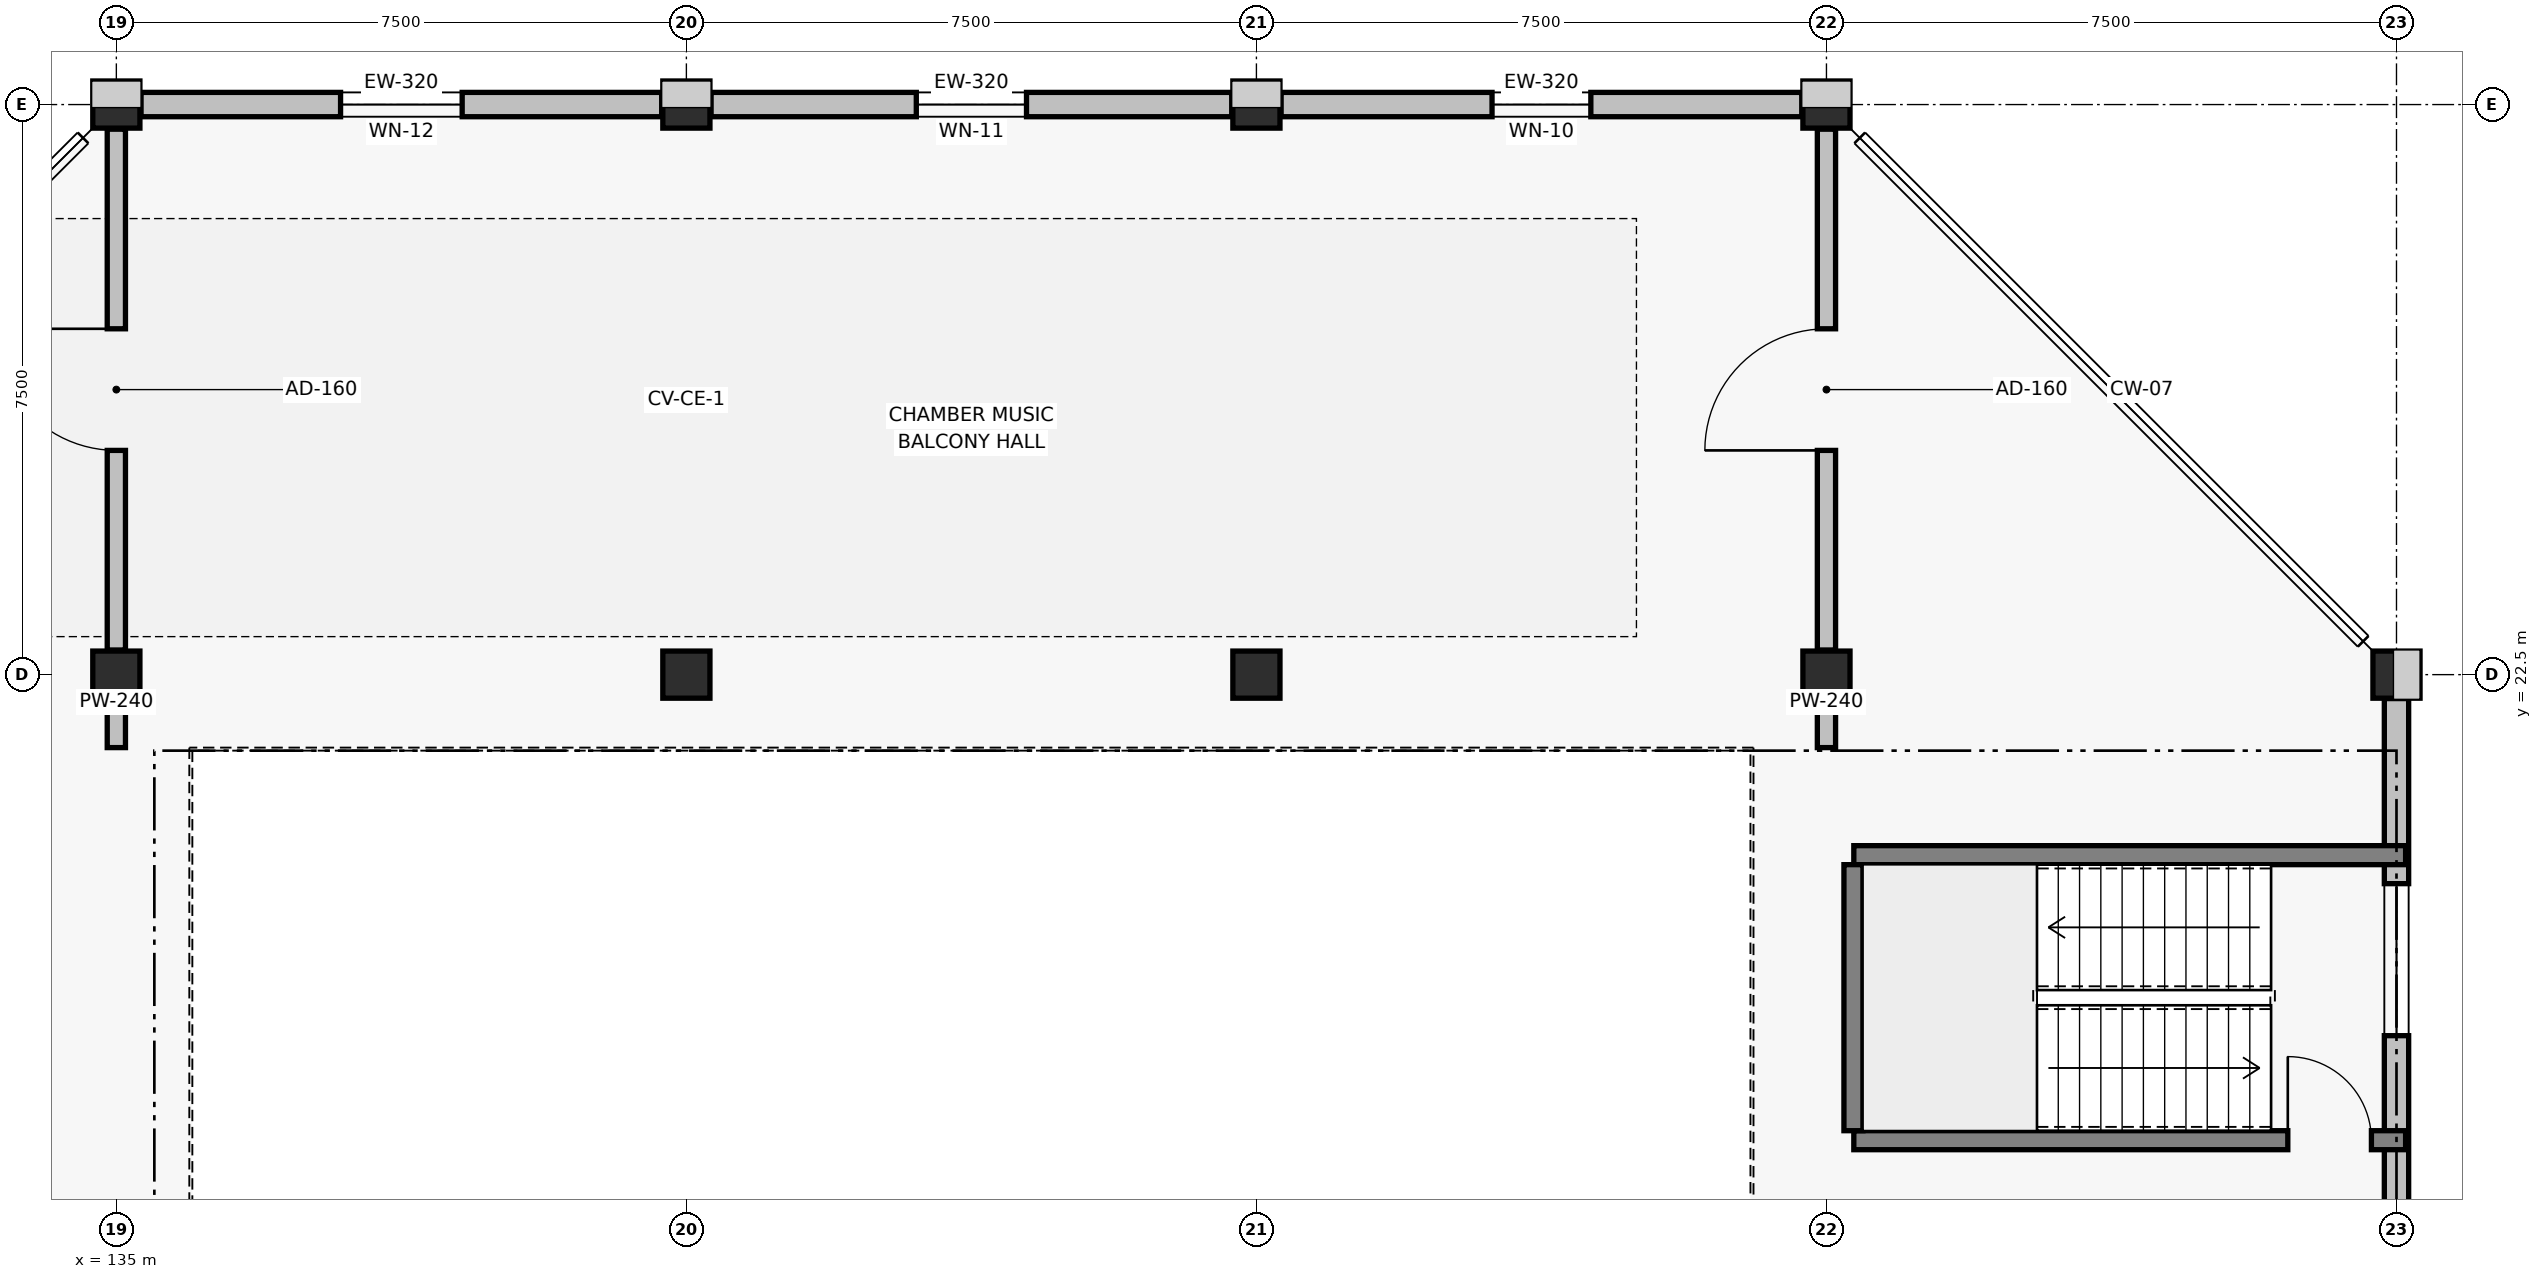
"""IFC4 building model, lengths in metres.
Left out: names, types, materials, properties, quantities, classifications, styles, units other than length and angle.
Written with IfcOpenShell. Run it as: python <this file> out.ifc"""

import sys

from ifc_helpers import new_model, si_unit, direction, frame, frame_2d, origin, origin_2d, place, context, subcontext, project, spatial, rectangle, extrude, element, fill, save


model = new_model("IFC4")
c1 = context("Model", 3, precision=1e-05, world=origin(), true_north=direction((0.0, 1.0)))
c2 = subcontext(c1, "Body", "Model", "MODEL_VIEW")
j1 = project(units=[si_unit("LENGTHUNIT", "METRE"), si_unit("PLANEANGLEUNIT", "RADIAN")], contexts=[c1])
p1 = place(None, origin())
s1 = spatial("IfcSite", under=j1, at=p1, CompositionType="ELEMENT")
p2 = place(p1, origin())
s2 = spatial("IfcBuilding", under=s1, at=p2, CompositionType="ELEMENT")
p3 = place(p2, frame((0.0, 0.0, 4.8)))
s3 = spatial("IfcBuildingStorey", under=s2, at=p3, CompositionType="ELEMENT", Elevation=4.8)
for number, where, z_axis, x_axis in (
    (1, (135.0, 22.5, 0.0), (0.0, 0.0, 1.0), (1.0, 0.0, 0.0)),
    (2, (135.0, 30.0, 0.0), (0.0, 0.0, 1.0), (1.0, 0.0, 0.0)),
    (3, (142.5, 22.5, 0.0), (0.0, 0.0, 1.0), (1.0, 0.0, 0.0)),
    (4, (142.5, 30.0, 0.0), (0.0, 0.0, 1.0), (1.0, 0.0, 0.0)),
    (5, (150.0, 22.5, 0.0), (0.0, 0.0, 1.0), (1.0, 0.0, 0.0)),
    (6, (150.0, 30.0, 0.0), (0.0, 0.0, 1.0), (1.0, 0.0, 0.0)),
    (7, (157.5, 22.5, 0.0), (0.0, 0.0, 1.0), (1.0, 0.0, 0.0)),
    (8, (157.5, 30.0, 0.0), (0.0, 0.0, 1.0), (1.0, 0.0, 0.0)),
    (9, (165.0, 22.5, 0.0), (0.0, 0.0, 1.0), (1.0, 0.0, 0.0)),
):
    element("IfcColumn", number, at=place(p3, frame(where, z_axis=z_axis, x_axis=x_axis)), inside=s3, PredefinedType="COLUMN", context=c2, shape_type="SweptSolid", body=[
        extrude(rectangle(XDim=0.62, YDim=0.62, at=origin_2d()), origin(), (0.0, 0.0, 1.0), 4.2),
    ])
p4 = place(p3, frame((165.0, 15.325, 0.0), z_axis=(0.0, 0.0, 1.0), x_axis=(0.0, 1.0, 0.0)))
e10 = element("IfcWall", 10, at=p4, inside=s3, PredefinedType="SOLIDWALL", context=c2, shape_type="SweptSolid", body=[
    extrude(rectangle(XDim=6.86, YDim=0.32, at=frame_2d((3.43, 0.0))), origin(), (0.0, 0.0, 1.0), 3.04),
])
p5 = place(p4, frame((2.425, 0.0, 0.6)))
e11 = element("IfcOpeningElement", 11, at=p5, cuts=e10, PredefinedType="OPENING", context=c2, shape_type="SweptSolid", body=[
    extrude(rectangle(XDim=2.0, YDim=1.45, at=frame_2d((1.0, 0.725))), frame((0.0, 0.17, 0.0), z_axis=(0.0, -1.0, 0.0), x_axis=(1.0, 0.0, 0.0)), (0.0, 0.0, 1.0), 0.34),
])
p6 = place(p3, frame((157.175, 30.0, 0.0), z_axis=(0.0, 0.0, 1.0), x_axis=(-1.0, 0.0, 0.0)))
e12 = element("IfcWall", 12, at=p6, inside=s3, PredefinedType="SOLIDWALL", context=c2, shape_type="SweptSolid", body=[
    extrude(rectangle(XDim=6.85, YDim=0.32, at=frame_2d((3.425, 0.0))), origin(), (0.0, 0.0, 1.0), 3.14),
])
p7 = place(p6, frame((2.775, 0.0, 0.6)))
e13 = element("IfcOpeningElement", 13, at=p7, cuts=e12, PredefinedType="OPENING", context=c2, shape_type="SweptSolid", body=[
    extrude(rectangle(XDim=1.3, YDim=1.3, at=frame_2d((0.65, 0.65))), frame((0.0, 0.17, 0.0), z_axis=(0.0, -1.0, 0.0), x_axis=(1.0, 0.0, 0.0)), (0.0, 0.0, 1.0), 0.34),
])
p8 = place(p3, frame((149.675, 30.0, 0.0), z_axis=(0.0, 0.0, 1.0), x_axis=(-1.0, 0.0, 0.0)))
e14 = element("IfcWall", 14, at=p8, inside=s3, PredefinedType="SOLIDWALL", context=c2, shape_type="SweptSolid", body=[
    extrude(rectangle(XDim=6.85, YDim=0.32, at=frame_2d((3.425, 0.0))), origin(), (0.0, 0.0, 1.0), 3.14),
])
p9 = place(p8, frame((2.7, 0.0, 0.6)))
e15 = element("IfcOpeningElement", 15, at=p9, cuts=e14, PredefinedType="OPENING", context=c2, shape_type="SweptSolid", body=[
    extrude(rectangle(XDim=1.45, YDim=1.3, at=frame_2d((0.725, 0.65))), frame((0.0, 0.17, 0.0), z_axis=(0.0, -1.0, 0.0), x_axis=(1.0, 0.0, 0.0)), (0.0, 0.0, 1.0), 0.34),
])
p10 = place(p3, frame((142.175, 30.0, 0.0), z_axis=(0.0, 0.0, 1.0), x_axis=(-1.0, 0.0, 0.0)))
e16 = element("IfcWall", 16, at=p10, inside=s3, PredefinedType="SOLIDWALL", context=c2, shape_type="SweptSolid", body=[
    extrude(rectangle(XDim=6.85, YDim=0.32, at=frame_2d((3.425, 0.0))), origin(), (0.0, 0.0, 1.0), 3.14),
])
p11 = place(p10, frame((2.625, 0.0, 0.6)))
e17 = element("IfcOpeningElement", 17, at=p11, cuts=e16, PredefinedType="OPENING", context=c2, shape_type="SweptSolid", body=[
    extrude(rectangle(XDim=1.6, YDim=1.3, at=frame_2d((0.8, 0.65))), frame((0.0, 0.17, 0.0), z_axis=(0.0, -1.0, 0.0), x_axis=(1.0, 0.0, 0.0)), (0.0, 0.0, 1.0), 0.34),
])
p12 = place(p3, frame((157.86, 16.375, 0.0), z_axis=(0.0, 0.0, 1.0), x_axis=(1.0, 0.0, 0.0)))
e18 = element("IfcWall", 18, at=p12, inside=s3, PredefinedType="SOLIDWALL", context=c2, shape_type="SweptSolid", body=[
    extrude(rectangle(XDim=7.26, YDim=0.25, at=frame_2d((3.63, 0.0))), origin(), (0.0, 0.0, 1.0), 3.92),
])
p13 = place(p12, frame((5.71, 0.0, 0.0)))
e19 = element("IfcOpeningElement", 19, at=p13, cuts=e18, PredefinedType="OPENING", context=c2, shape_type="SweptSolid", body=[
    extrude(rectangle(XDim=1.1, YDim=2.15, at=frame_2d((0.55, 1.075))), frame((0.0, 0.135, 0.0), z_axis=(0.0, -1.0, 0.0), x_axis=(1.0, 0.0, 0.0)), (0.0, 0.0, 1.0), 0.27),
])
p14 = place(p3, frame((157.86, 20.125, 0.0), z_axis=(0.0, 0.0, 1.0), x_axis=(1.0, 0.0, 0.0)))
e20 = element("IfcWall", 20, at=p14, inside=s3, PredefinedType="SOLIDWALL", context=c2, shape_type="SweptSolid", body=[
    extrude(rectangle(XDim=7.26, YDim=0.25, at=frame_2d((3.63, 0.0))), origin(), (0.0, 0.0, 1.0), 3.92),
])
p15 = place(p3, frame((157.855, 16.5, 0.0), z_axis=(0.0, 0.0, 1.0), x_axis=(0.0, 1.0, 0.0)))
e21 = element("IfcWall", 21, at=p15, inside=s3, PredefinedType="SOLIDWALL", context=c2, shape_type="SweptSolid", body=[
    extrude(rectangle(XDim=3.5, YDim=0.25, at=frame_2d((1.75, 0.0))), origin(), (0.0, 0.0, 1.0), 3.92),
])
p16 = place(p3, frame((135.0, 21.54, 0.0), z_axis=(0.0, 0.0, 1.0), x_axis=(0.0, 1.0, 0.0)))
e22 = element("IfcWall", 22, at=p16, inside=s3, PredefinedType="PARTITIONING", context=c2, shape_type="SweptSolid", body=[
    extrude(rectangle(XDim=0.636, YDim=0.24, at=frame_2d((0.318, 0.0))), origin(), (0.0, 0.0, 1.0), 2.94),
])
p17 = place(p3, frame((135.0, 22.824, 0.0), z_axis=(0.0, 0.0, 1.0), x_axis=(0.0, 1.0, 0.0)))
e23 = element("IfcWall", 23, at=p17, inside=s3, PredefinedType="PARTITIONING", context=c2, shape_type="SweptSolid", body=[
    extrude(rectangle(XDim=6.852, YDim=0.24, at=frame_2d((3.426, 0.0))), origin(), (0.0, 0.0, 1.0), 2.94),
])
p18 = place(p17, frame((2.626, 0.0, 0.0)))
e24 = element("IfcOpeningElement", 24, at=p18, cuts=e23, PredefinedType="OPENING", context=c2, shape_type="SweptSolid", body=[
    extrude(rectangle(XDim=1.6, YDim=2.16, at=frame_2d((0.8, 1.08))), frame((0.0, 0.13, 0.0), z_axis=(0.0, -1.0, 0.0), x_axis=(1.0, 0.0, 0.0)), (0.0, 0.0, 1.0), 0.26),
])
p19 = place(p3, frame((157.5, 21.54, 0.0), z_axis=(0.0, 0.0, 1.0), x_axis=(0.0, 1.0, 0.0)))
e25 = element("IfcWall", 25, at=p19, inside=s3, PredefinedType="PARTITIONING", context=c2, shape_type="SweptSolid", body=[
    extrude(rectangle(XDim=0.636, YDim=0.24, at=frame_2d((0.318, 0.0))), origin(), (0.0, 0.0, 1.0), 2.84),
])
p20 = place(p3, frame((157.5, 22.824, 0.0), z_axis=(0.0, 0.0, 1.0), x_axis=(0.0, 1.0, 0.0)))
e26 = element("IfcWall", 26, at=p20, inside=s3, PredefinedType="PARTITIONING", context=c2, shape_type="SweptSolid", body=[
    extrude(rectangle(XDim=6.852, YDim=0.24, at=frame_2d((3.426, 0.0))), origin(), (0.0, 0.0, 1.0), 2.84),
])
p21 = place(p20, frame((2.626, 0.0, 0.0)))
e27 = element("IfcOpeningElement", 27, at=p21, cuts=e26, PredefinedType="OPENING", context=c2, shape_type="SweptSolid", body=[
    extrude(rectangle(XDim=1.6, YDim=2.16, at=frame_2d((0.8, 1.08))), frame((0.0, 0.13, 0.0), z_axis=(0.0, -1.0, 0.0), x_axis=(1.0, 0.0, 0.0)), (0.0, 0.0, 1.0), 0.26),
])
p22 = place(p5, origin())
e28 = element("IfcWindow", 28, at=p22, inside=s3, PartitioningType="SINGLE_PANEL", PredefinedType="WINDOW", context=c2, shape_type="SweptSolid", body=[
    extrude(rectangle(XDim=2.0, YDim=1.45, at=frame_2d((1.0, 0.725))), frame((0.0, 0.03, 0.0), z_axis=(0.0, -1.0, 0.0), x_axis=(1.0, 0.0, 0.0)), (0.0, 0.0, 1.0), 0.06),
])
fill(e11, e28)
p23 = place(p7, origin())
e29 = element("IfcWindow", 29, at=p23, inside=s3, PartitioningType="SINGLE_PANEL", PredefinedType="WINDOW", context=c2, shape_type="SweptSolid", body=[
    extrude(rectangle(XDim=1.3, YDim=1.3, at=frame_2d((0.65, 0.65))), frame((0.0, 0.03, 0.0), z_axis=(0.0, -1.0, 0.0), x_axis=(1.0, 0.0, 0.0)), (0.0, 0.0, 1.0), 0.06),
])
fill(e13, e29)
p24 = place(p9, origin())
e30 = element("IfcWindow", 30, at=p24, inside=s3, PartitioningType="SINGLE_PANEL", PredefinedType="WINDOW", context=c2, shape_type="SweptSolid", body=[
    extrude(rectangle(XDim=1.45, YDim=1.3, at=frame_2d((0.725, 0.65))), frame((0.0, 0.03, 0.0), z_axis=(0.0, -1.0, 0.0), x_axis=(1.0, 0.0, 0.0)), (0.0, 0.0, 1.0), 0.06),
])
fill(e15, e30)
p25 = place(p11, origin())
e31 = element("IfcWindow", 31, at=p25, inside=s3, PartitioningType="SINGLE_PANEL", PredefinedType="WINDOW", context=c2, shape_type="SweptSolid", body=[
    extrude(rectangle(XDim=1.6, YDim=1.3, at=frame_2d((0.8, 0.65))), frame((0.0, 0.03, 0.0), z_axis=(0.0, -1.0, 0.0), x_axis=(1.0, 0.0, 0.0)), (0.0, 0.0, 1.0), 0.06),
])
fill(e17, e31)
p26 = place(p13, origin())
e32 = element("IfcDoor", 32, at=p26, inside=s3, OperationType="SINGLE_SWING_LEFT", PredefinedType="DOOR", context=c2, shape_type="SweptSolid", body=[
    extrude(rectangle(XDim=1.1, YDim=2.15, at=frame_2d((0.55, 1.075))), frame((0.0, 0.025, 0.0), z_axis=(0.0, -1.0, 0.0), x_axis=(1.0, 0.0, 0.0)), (0.0, 0.0, 1.0), 0.05),
])
fill(e19, e32)
p27 = place(p18, origin())
e33 = element("IfcDoor", 33, at=p27, inside=s3, OperationType="SINGLE_SWING_RIGHT", PredefinedType="DOOR", context=c2, shape_type="SweptSolid", body=[
    extrude(rectangle(XDim=1.6, YDim=2.16, at=frame_2d((0.8, 1.08))), frame((0.0, 0.025, 0.0), z_axis=(0.0, -1.0, 0.0), x_axis=(1.0, 0.0, 0.0)), (0.0, 0.0, 1.0), 0.05),
])
fill(e24, e33)
p28 = place(p21, origin())
e34 = element("IfcDoor", 34, at=p28, inside=s3, OperationType="SINGLE_SWING_LEFT", PredefinedType="DOOR", context=c2, shape_type="SweptSolid", body=[
    extrude(rectangle(XDim=1.6, YDim=2.16, at=frame_2d((0.8, 1.08))), frame((0.0, 0.025, 0.0), z_axis=(0.0, -1.0, 0.0), x_axis=(1.0, 0.0, 0.0)), (0.0, 0.0, 1.0), 0.05),
])
fill(e27, e34)
save(model, sys.argv[1])
